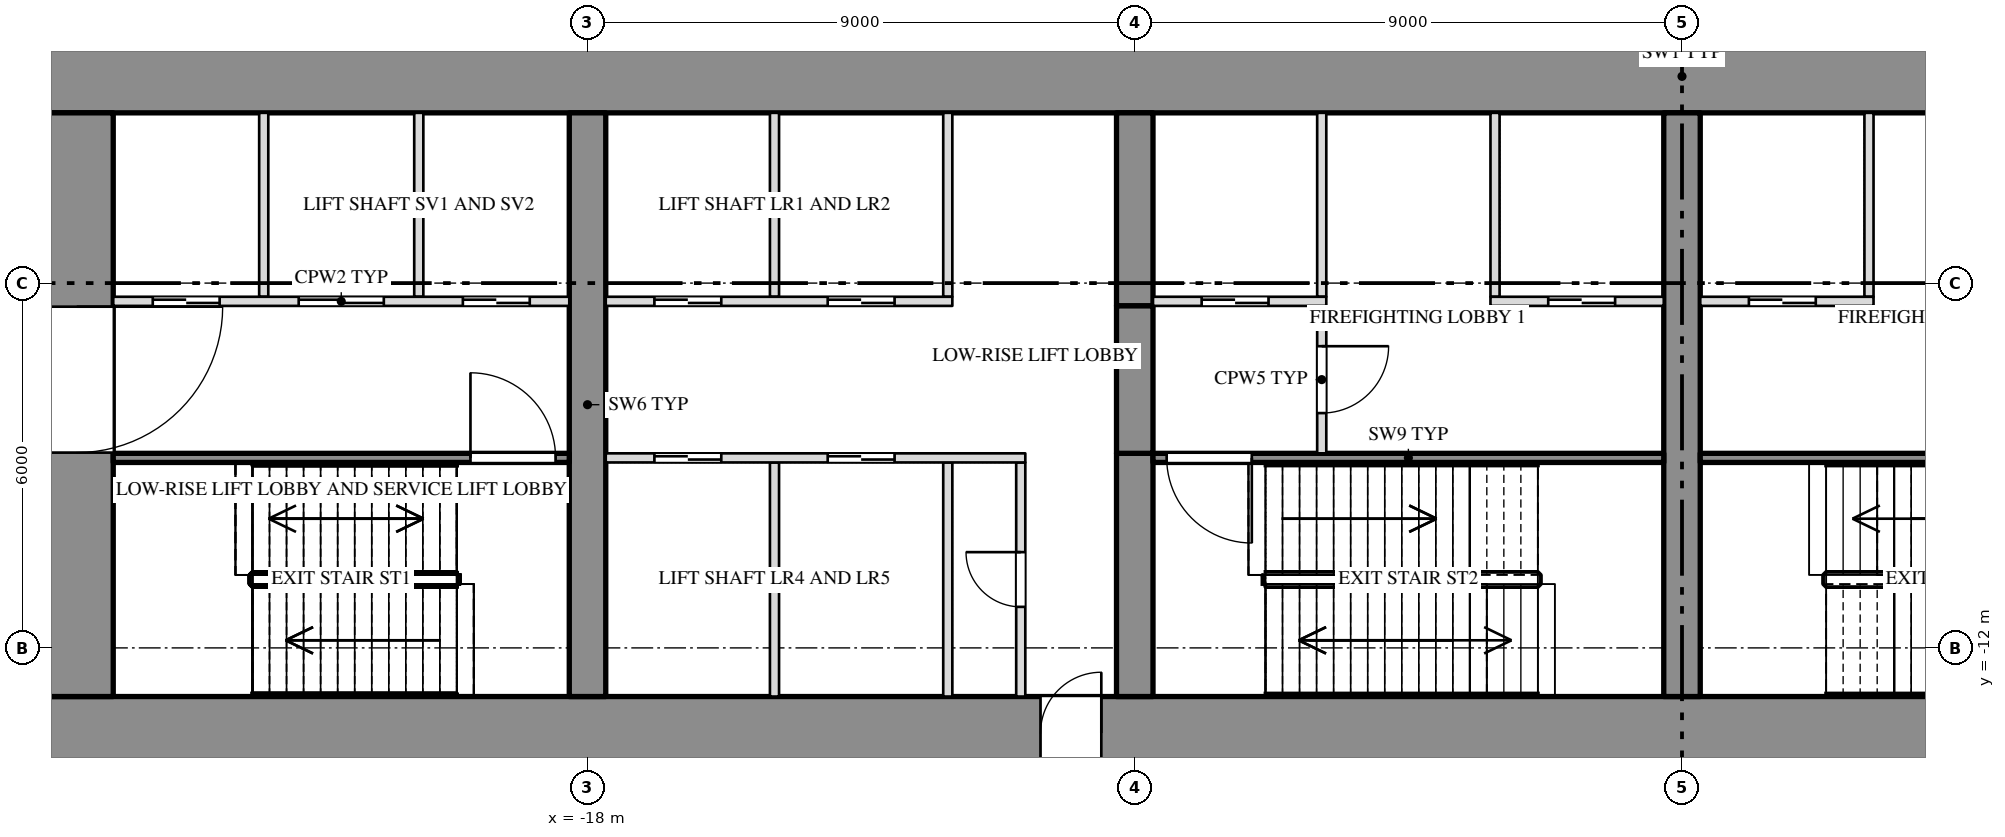
"""IFC4 building model, lengths in metres.
Left out: names, types, materials, properties, quantities, classifications, styles, units other than length and angle.
Written with IfcOpenShell. Run it as: python <this file> out.ifc"""

import sys

from ifc_helpers import new_model, si_unit, direction, frame, frame_2d, origin, place, context, subcontext, project, spatial, rectangle, extrude, element, fill, save


model = new_model("IFC4")
c1 = context("Model", 3, precision=1e-05, world=origin(), true_north=direction((0.0, 1.0)))
c2 = subcontext(c1, "Body", "Model", "MODEL_VIEW")
j1 = project(units=[si_unit("LENGTHUNIT", "METRE"), si_unit("PLANEANGLEUNIT", "RADIAN")], contexts=[c1])
p1 = place(None, origin())
s1 = spatial("IfcSite", under=j1, at=p1, CompositionType="ELEMENT")
p2 = place(p1, origin())
s2 = spatial("IfcBuilding", under=s1, at=p2, CompositionType="ELEMENT")
p3 = place(p2, frame((0.0, 0.0, 9.0)))
s3 = spatial("IfcBuildingStorey", under=s2, at=p3, CompositionType="ELEMENT", Elevation=9.0)
p4 = place(p3, frame((-27.0, -2.6, 0.0), z_axis=(0.0, 0.0, 1.0), x_axis=(1.0, 0.0, 0.0)))
e1 = element("IfcWall", 1, at=p4, inside=s3, PredefinedType="SHEAR", context=c2, shape_type="SweptSolid", body=[
    extrude(rectangle(XDim=54.0, YDim=1.2, at=frame_2d((27.0, 0.0))), origin(), (0.0, 0.0, 1.0), 5.7),
])
p5 = place(p3, frame((-27.0, -13.4, 0.0), z_axis=(0.0, 0.0, 1.0), x_axis=(1.0, 0.0, 0.0)))
e2 = element("IfcWall", 2, at=p5, inside=s3, PredefinedType="SHEAR", context=c2, shape_type="SweptSolid", body=[
    extrude(rectangle(XDim=54.0, YDim=1.2, at=frame_2d((27.0, 0.0))), origin(), (0.0, 0.0, 1.0), 5.7),
])
p6 = place(p5, frame((16.45, 0.0, 0.0)))
e3 = element("IfcOpeningElement", 3, at=p6, cuts=e2, PredefinedType="OPENING", context=c2, shape_type="SweptSolid", body=[
    extrude(rectangle(XDim=1.0, YDim=2.1, at=frame_2d((0.5, 1.05))), frame((0.0, 0.612, 0.0), z_axis=(0.0, -1.0, 0.0), x_axis=(1.0, 0.0, 0.0)), (0.0, 0.0, 1.0), 1.224),
])
p7 = place(p5, frame((36.55, 0.0, 0.0)))
e4 = element("IfcOpeningElement", 4, at=p7, cuts=e2, PredefinedType="OPENING", context=c2, shape_type="SweptSolid", body=[
    extrude(rectangle(XDim=1.0, YDim=2.1, at=frame_2d((0.5, 1.05))), frame((0.0, 0.612, 0.0), z_axis=(0.0, -1.0, 0.0), x_axis=(1.0, 0.0, 0.0)), (0.0, 0.0, 1.0), 1.224),
])
p8 = place(p3, frame((-26.4, -12.8, 0.0), z_axis=(0.0, 0.0, 1.0), x_axis=(0.0, 1.0, 0.0)))
e5 = element("IfcWall", 5, at=p8, inside=s3, PredefinedType="SHEAR", context=c2, shape_type="SweptSolid", body=[
    extrude(rectangle(XDim=9.6, YDim=1.2, at=frame_2d((4.8, 0.0))), origin(), (0.0, 0.0, 1.0), 5.7),
])
p9 = place(p8, frame((4.012, 0.0, 0.0)))
e6 = element("IfcOpeningElement", 6, at=p9, cuts=e5, PredefinedType="OPENING", context=c2, shape_type="SweptSolid", body=[
    extrude(rectangle(XDim=2.4, YDim=2.1, at=frame_2d((1.2, 1.05))), frame((0.0, 0.612, 0.0), z_axis=(0.0, -1.0, 0.0), x_axis=(1.0, 0.0, 0.0)), (0.0, 0.0, 1.0), 1.224),
])
p10 = place(p3, frame((-18.0, -12.8, 0.0), z_axis=(0.0, 0.0, 1.0), x_axis=(0.0, 1.0, 0.0)))
e7 = element("IfcWall", 7, at=p10, inside=s3, PredefinedType="SHEAR", context=c2, shape_type="SweptSolid", body=[
    extrude(rectangle(XDim=9.6, YDim=0.6, at=frame_2d((4.8, 0.0))), origin(), (0.0, 0.0, 1.0), 5.7),
])
p11 = place(p3, frame((-9.0, -12.8, 0.0), z_axis=(0.0, 0.0, 1.0), x_axis=(0.0, 1.0, 0.0)))
e8 = element("IfcWall", 8, at=p11, inside=s3, PredefinedType="SHEAR", context=c2, shape_type="SweptSolid", body=[
    extrude(rectangle(XDim=4.0, YDim=0.6, at=frame_2d((2.0, 0.0))), origin(), (0.0, 0.0, 1.0), 5.7),
])
p12 = place(p3, frame((-9.0, -6.375, 0.0), z_axis=(0.0, 0.0, 1.0), x_axis=(0.0, 1.0, 0.0)))
e9 = element("IfcWall", 9, at=p12, inside=s3, PredefinedType="SHEAR", context=c2, shape_type="SweptSolid", body=[
    extrude(rectangle(XDim=3.175, YDim=0.6, at=frame_2d((1.587, 0.0))), origin(), (0.0, 0.0, 1.0), 5.7),
])
p13 = place(p3, frame((-9.0, -8.8, 3.6), z_axis=(0.0, 0.0, 1.0), x_axis=(0.0, 1.0, 0.0)))
e10 = element("IfcWall", 10, at=p13, inside=s3, PredefinedType="SHEAR", context=c2, shape_type="SweptSolid", body=[
    extrude(rectangle(XDim=2.425, YDim=0.6, at=frame_2d((1.212, 0.0))), origin(), (0.0, 0.0, 1.0), 2.1),
])
p14 = place(p3, frame((0.0, -12.8, 0.0), z_axis=(0.0, 0.0, 1.0), x_axis=(0.0, 1.0, 0.0)))
e11 = element("IfcWall", 11, at=p14, inside=s3, PredefinedType="SHEAR", context=c2, shape_type="SweptSolid", body=[
    extrude(rectangle(XDim=9.6, YDim=0.6, at=frame_2d((4.8, 0.0))), origin(), (0.0, 0.0, 1.0), 5.7),
])
for number, where, z_axis, x_axis in (
    (12, (-20.775, -6.225, 0.0), (0.0, 0.0, 1.0), (0.0, 1.0, 0.0)),
    (13, (-23.325, -6.225, 0.0), (0.0, 0.0, 1.0), (0.0, 1.0, 0.0)),
    (14, (-12.075, -6.225, 0.0), (0.0, 0.0, 1.0), (0.0, 1.0, 0.0)),
    (15, (-14.925, -6.225, 0.0), (0.0, 0.0, 1.0), (0.0, 1.0, 0.0)),
    (16, (-3.075, -6.225, 0.0), (0.0, 0.0, 1.0), (0.0, 1.0, 0.0)),
    (17, (-5.925, -6.225, 0.0), (0.0, 0.0, 1.0), (0.0, 1.0, 0.0)),
    (18, (3.075, -6.225, 0.0), (0.0, 0.0, 1.0), (0.0, 1.0, 0.0)),
):
    element("IfcWall", number, at=place(p3, frame(where, z_axis=z_axis, x_axis=x_axis)), inside=s3, PredefinedType="PARTITIONING", context=c2, shape_type="SweptSolid", body=[
        extrude(rectangle(XDim=3.025, YDim=0.15, at=frame_2d((1.513, 0.0))), origin(), (0.0, 0.0, 1.0), 5.7),
    ])
p15 = place(p3, frame((-10.875, -12.8, 0.0), z_axis=(0.0, 0.0, 1.0), x_axis=(0.0, 1.0, 0.0)))
e19 = element("IfcWall", 19, at=p15, inside=s3, PredefinedType="PARTITIONING", context=c2, shape_type="SweptSolid", body=[
    extrude(rectangle(XDim=3.85, YDim=0.15, at=frame_2d((1.925, 0.0))), origin(), (0.0, 0.0, 1.0), 5.7),
])
p16 = place(p15, frame((1.475, 0.0, 0.0)))
e20 = element("IfcOpeningElement", 20, at=p16, cuts=e19, PredefinedType="OPENING", context=c2, shape_type="SweptSolid", body=[
    extrude(rectangle(XDim=0.9, YDim=2.1, at=frame_2d((0.45, 1.05))), frame((0.0, 0.087, 0.0), z_axis=(0.0, -1.0, 0.0), x_axis=(1.0, 0.0, 0.0)), (0.0, 0.0, 1.0), 0.174),
])
for number, where, z_axis, x_axis in (
    (21, (-12.075, -12.8, 0.0), (0.0, 0.0, 1.0), (0.0, 1.0, 0.0)),
    (22, (-14.925, -12.8, 0.0), (0.0, 0.0, 1.0), (0.0, 1.0, 0.0)),
):
    element("IfcWall", number, at=place(p3, frame(where, z_axis=z_axis, x_axis=x_axis)), inside=s3, PredefinedType="PARTITIONING", context=c2, shape_type="SweptSolid", body=[
        extrude(rectangle(XDim=3.85, YDim=0.15, at=frame_2d((1.925, 0.0))), origin(), (0.0, 0.0, 1.0), 5.7),
    ])
p17 = place(p3, frame((-5.925, -8.8, 0.0), z_axis=(0.0, 0.0, 1.0), x_axis=(0.0, 1.0, 0.0)))
e23 = element("IfcWall", 23, at=p17, inside=s3, PredefinedType="PARTITIONING", context=c2, shape_type="SweptSolid", body=[
    extrude(rectangle(XDim=2.425, YDim=0.15, at=frame_2d((1.212, 0.0))), origin(), (0.0, 0.0, 1.0), 5.7),
])
p18 = place(p17, frame((0.662, 0.0, 0.0)))
e24 = element("IfcOpeningElement", 24, at=p18, cuts=e23, PredefinedType="OPENING", context=c2, shape_type="SweptSolid", body=[
    extrude(rectangle(XDim=1.1, YDim=2.1, at=frame_2d((0.55, 1.05))), frame((0.0, 0.087, 0.0), z_axis=(0.0, -1.0, 0.0), x_axis=(1.0, 0.0, 0.0)), (0.0, 0.0, 1.0), 0.174),
])
p19 = place(p3, frame((-25.8, -6.3, 0.0), z_axis=(0.0, 0.0, 1.0), x_axis=(1.0, 0.0, 0.0)))
e25 = element("IfcWall", 25, at=p19, inside=s3, PredefinedType="PARTITIONING", context=c2, shape_type="SweptSolid", body=[
    extrude(rectangle(XDim=7.5, YDim=0.15, at=frame_2d((3.75, 0.0))), origin(), (0.0, 0.0, 1.0), 5.7),
])
p20 = place(p19, frame((0.65, 0.0, 0.0)))
e26 = element("IfcOpeningElement", 26, at=p20, cuts=e25, PredefinedType="OPENING", context=c2, shape_type="SweptSolid", body=[
    extrude(rectangle(XDim=1.1, YDim=2.1, at=frame_2d((0.55, 1.05))), frame((0.0, 0.087, 0.0), z_axis=(0.0, -1.0, 0.0), x_axis=(1.0, 0.0, 0.0)), (0.0, 0.0, 1.0), 0.174),
])
p21 = place(p19, frame((3.05, 0.0, 0.0)))
e27 = element("IfcOpeningElement", 27, at=p21, cuts=e25, PredefinedType="OPENING", context=c2, shape_type="SweptSolid", body=[
    extrude(rectangle(XDim=1.4, YDim=2.1, at=frame_2d((0.7, 1.05))), frame((0.0, 0.087, 0.0), z_axis=(0.0, -1.0, 0.0), x_axis=(1.0, 0.0, 0.0)), (0.0, 0.0, 1.0), 0.174),
])
p22 = place(p19, frame((5.75, 0.0, 0.0)))
e28 = element("IfcOpeningElement", 28, at=p22, cuts=e25, PredefinedType="OPENING", context=c2, shape_type="SweptSolid", body=[
    extrude(rectangle(XDim=1.1, YDim=2.1, at=frame_2d((0.55, 1.05))), frame((0.0, 0.087, 0.0), z_axis=(0.0, -1.0, 0.0), x_axis=(1.0, 0.0, 0.0)), (0.0, 0.0, 1.0), 0.174),
])
p23 = place(p3, frame((-17.7, -6.3, 0.0), z_axis=(0.0, 0.0, 1.0), x_axis=(1.0, 0.0, 0.0)))
e29 = element("IfcWall", 29, at=p23, inside=s3, PredefinedType="PARTITIONING", context=c2, shape_type="SweptSolid", body=[
    extrude(rectangle(XDim=5.7, YDim=0.15, at=frame_2d((2.85, 0.0))), origin(), (0.0, 0.0, 1.0), 5.7),
])
p24 = place(p23, frame((0.8, 0.0, 0.0)))
e30 = element("IfcOpeningElement", 30, at=p24, cuts=e29, PredefinedType="OPENING", context=c2, shape_type="SweptSolid", body=[
    extrude(rectangle(XDim=1.1, YDim=2.1, at=frame_2d((0.55, 1.05))), frame((0.0, 0.087, 0.0), z_axis=(0.0, -1.0, 0.0), x_axis=(1.0, 0.0, 0.0)), (0.0, 0.0, 1.0), 0.174),
])
p25 = place(p23, frame((3.65, 0.0, 0.0)))
e31 = element("IfcOpeningElement", 31, at=p25, cuts=e29, PredefinedType="OPENING", context=c2, shape_type="SweptSolid", body=[
    extrude(rectangle(XDim=1.1, YDim=2.1, at=frame_2d((0.55, 1.05))), frame((0.0, 0.087, 0.0), z_axis=(0.0, -1.0, 0.0), x_axis=(1.0, 0.0, 0.0)), (0.0, 0.0, 1.0), 0.174),
])
p26 = place(p3, frame((-8.7, -6.3, 0.0), z_axis=(0.0, 0.0, 1.0), x_axis=(1.0, 0.0, 0.0)))
e32 = element("IfcWall", 32, at=p26, inside=s3, PredefinedType="PARTITIONING", context=c2, shape_type="SweptSolid", body=[
    extrude(rectangle(XDim=2.85, YDim=0.15, at=frame_2d((1.425, 0.0))), origin(), (0.0, 0.0, 1.0), 5.7),
])
p27 = place(p26, frame((0.8, 0.0, 0.0)))
e33 = element("IfcOpeningElement", 33, at=p27, cuts=e32, PredefinedType="OPENING", context=c2, shape_type="SweptSolid", body=[
    extrude(rectangle(XDim=1.1, YDim=2.1, at=frame_2d((0.55, 1.05))), frame((0.0, 0.087, 0.0), z_axis=(0.0, -1.0, 0.0), x_axis=(1.0, 0.0, 0.0)), (0.0, 0.0, 1.0), 0.174),
])
p28 = place(p3, frame((-3.15, -6.3, 0.0), z_axis=(0.0, 0.0, 1.0), x_axis=(1.0, 0.0, 0.0)))
e34 = element("IfcWall", 34, at=p28, inside=s3, PredefinedType="PARTITIONING", context=c2, shape_type="SweptSolid", body=[
    extrude(rectangle(XDim=2.85, YDim=0.15, at=frame_2d((1.425, 0.0))), origin(), (0.0, 0.0, 1.0), 5.7),
])
p29 = place(p28, frame((0.95, 0.0, 0.0)))
e35 = element("IfcOpeningElement", 35, at=p29, cuts=e34, PredefinedType="OPENING", context=c2, shape_type="SweptSolid", body=[
    extrude(rectangle(XDim=1.1, YDim=2.1, at=frame_2d((0.55, 1.05))), frame((0.0, 0.087, 0.0), z_axis=(0.0, -1.0, 0.0), x_axis=(1.0, 0.0, 0.0)), (0.0, 0.0, 1.0), 0.174),
])
p30 = place(p3, frame((0.3, -6.3, 0.0), z_axis=(0.0, 0.0, 1.0), x_axis=(1.0, 0.0, 0.0)))
e36 = element("IfcWall", 36, at=p30, inside=s3, PredefinedType="PARTITIONING", context=c2, shape_type="SweptSolid", body=[
    extrude(rectangle(XDim=2.85, YDim=0.15, at=frame_2d((1.425, 0.0))), origin(), (0.0, 0.0, 1.0), 5.7),
])
p31 = place(p30, frame((0.8, 0.0, 0.0)))
e37 = element("IfcOpeningElement", 37, at=p31, cuts=e36, PredefinedType="OPENING", context=c2, shape_type="SweptSolid", body=[
    extrude(rectangle(XDim=1.1, YDim=2.1, at=frame_2d((0.55, 1.05))), frame((0.0, 0.087, 0.0), z_axis=(0.0, -1.0, 0.0), x_axis=(1.0, 0.0, 0.0)), (0.0, 0.0, 1.0), 0.174),
])
p32 = place(p3, frame((-25.8, -8.875, 0.0), z_axis=(0.0, 0.0, 1.0), x_axis=(1.0, 0.0, 0.0)))
e38 = element("IfcWall", 38, at=p32, inside=s3, PredefinedType="SHEAR", context=c2, shape_type="SweptSolid", body=[
    extrude(rectangle(XDim=7.5, YDim=0.15, at=frame_2d((3.75, 0.0))), origin(), (0.0, 0.0, 1.0), 5.7),
])
p33 = place(p32, frame((5.875, 0.0, 0.0)))
e39 = element("IfcOpeningElement", 39, at=p33, cuts=e38, PredefinedType="OPENING", context=c2, shape_type="SweptSolid", body=[
    extrude(rectangle(XDim=1.4, YDim=2.1, at=frame_2d((0.7, 1.05))), frame((0.0, 0.087, 0.0), z_axis=(0.0, -1.0, 0.0), x_axis=(1.0, 0.0, 0.0)), (0.0, 0.0, 1.0), 0.174),
])
p34 = place(p3, frame((-17.7, -8.875, 0.0), z_axis=(0.0, 0.0, 1.0), x_axis=(1.0, 0.0, 0.0)))
e40 = element("IfcWall", 40, at=p34, inside=s3, PredefinedType="PARTITIONING", context=c2, shape_type="SweptSolid", body=[
    extrude(rectangle(XDim=6.9, YDim=0.15, at=frame_2d((3.45, 0.0))), origin(), (0.0, 0.0, 1.0), 5.7),
])
p35 = place(p34, frame((0.8, 0.0, 0.0)))
e41 = element("IfcOpeningElement", 41, at=p35, cuts=e40, PredefinedType="OPENING", context=c2, shape_type="SweptSolid", body=[
    extrude(rectangle(XDim=1.1, YDim=2.1, at=frame_2d((0.55, 1.05))), frame((0.0, 0.087, 0.0), z_axis=(0.0, -1.0, 0.0), x_axis=(1.0, 0.0, 0.0)), (0.0, 0.0, 1.0), 0.174),
])
p36 = place(p34, frame((3.65, 0.0, 0.0)))
e42 = element("IfcOpeningElement", 42, at=p36, cuts=e40, PredefinedType="OPENING", context=c2, shape_type="SweptSolid", body=[
    extrude(rectangle(XDim=1.1, YDim=2.1, at=frame_2d((0.55, 1.05))), frame((0.0, 0.087, 0.0), z_axis=(0.0, -1.0, 0.0), x_axis=(1.0, 0.0, 0.0)), (0.0, 0.0, 1.0), 0.174),
])
p37 = place(p3, frame((-8.7, -8.875, 0.0), z_axis=(0.0, 0.0, 1.0), x_axis=(1.0, 0.0, 0.0)))
e43 = element("IfcWall", 43, at=p37, inside=s3, PredefinedType="SHEAR", context=c2, shape_type="SweptSolid", body=[
    extrude(rectangle(XDim=8.4, YDim=0.15, at=frame_2d((4.2, 0.0))), origin(), (0.0, 0.0, 1.0), 5.7),
])
p38 = place(p37, frame((0.225, 0.0, 0.0)))
e44 = element("IfcOpeningElement", 44, at=p38, cuts=e43, PredefinedType="OPENING", context=c2, shape_type="SweptSolid", body=[
    extrude(rectangle(XDim=1.4, YDim=2.1, at=frame_2d((0.7, 1.05))), frame((0.0, 0.087, 0.0), z_axis=(0.0, -1.0, 0.0), x_axis=(1.0, 0.0, 0.0)), (0.0, 0.0, 1.0), 0.174),
])
p39 = place(p3, frame((0.3, -8.875, 0.0), z_axis=(0.0, 0.0, 1.0), x_axis=(1.0, 0.0, 0.0)))
e45 = element("IfcWall", 45, at=p39, inside=s3, PredefinedType="SHEAR", context=c2, shape_type="SweptSolid", body=[
    extrude(rectangle(XDim=8.4, YDim=0.15, at=frame_2d((4.2, 0.0))), origin(), (0.0, 0.0, 1.0), 5.7),
])
p40 = place(p39, frame((6.775, 0.0, 0.0)))
e46 = element("IfcOpeningElement", 46, at=p40, cuts=e45, PredefinedType="OPENING", context=c2, shape_type="SweptSolid", body=[
    extrude(rectangle(XDim=1.4, YDim=2.1, at=frame_2d((0.7, 1.05))), frame((0.0, 0.087, 0.0), z_axis=(0.0, -1.0, 0.0), x_axis=(1.0, 0.0, 0.0)), (0.0, 0.0, 1.0), 0.174),
])
p41 = place(p9, origin())
e47 = element("IfcDoor", 47, at=p41, inside=s3, OperationType="DOUBLE_DOOR_SINGLE_SWING", PredefinedType="DOOR", context=c2, shape_type="SweptSolid", body=[
    extrude(rectangle(XDim=2.4, YDim=2.1, at=frame_2d((1.2, 1.05))), frame((0.0, 0.025, 0.0), z_axis=(0.0, -1.0, 0.0), x_axis=(1.0, 0.0, 0.0)), (0.0, 0.0, 1.0), 0.05),
])
fill(e6, e47)
p42 = place(p20, origin())
e48 = element("IfcDoor", 48, at=p42, inside=s3, OperationType="SLIDING_TO_RIGHT", PredefinedType="DOOR", context=c2, shape_type="SweptSolid", body=[
    extrude(rectangle(XDim=1.1, YDim=2.1, at=frame_2d((0.55, 1.05))), frame((0.0, 0.025, 0.0), z_axis=(0.0, -1.0, 0.0), x_axis=(1.0, 0.0, 0.0)), (0.0, 0.0, 1.0), 0.05),
])
fill(e26, e48)
p43 = place(p21, origin())
e49 = element("IfcDoor", 49, at=p43, inside=s3, OperationType="SLIDING_TO_LEFT", PredefinedType="DOOR", context=c2, shape_type="SweptSolid", body=[
    extrude(rectangle(XDim=1.4, YDim=2.1, at=frame_2d((0.7, 1.05))), frame((0.0, 0.025, 0.0), z_axis=(0.0, -1.0, 0.0), x_axis=(1.0, 0.0, 0.0)), (0.0, 0.0, 1.0), 0.05),
])
fill(e27, e49)
p44 = place(p22, origin())
e50 = element("IfcDoor", 50, at=p44, inside=s3, OperationType="SLIDING_TO_RIGHT", PredefinedType="DOOR", context=c2, shape_type="SweptSolid", body=[
    extrude(rectangle(XDim=1.1, YDim=2.1, at=frame_2d((0.55, 1.05))), frame((0.0, 0.025, 0.0), z_axis=(0.0, -1.0, 0.0), x_axis=(1.0, 0.0, 0.0)), (0.0, 0.0, 1.0), 0.05),
])
fill(e28, e50)
p45 = place(p33, origin())
e51 = element("IfcDoor", 51, at=p45, inside=s3, OperationType="DOUBLE_DOOR_SINGLE_SWING", PredefinedType="DOOR", context=c2, shape_type="SweptSolid", body=[
    extrude(rectangle(XDim=1.4, YDim=2.1, at=frame_2d((0.7, 1.05))), frame((0.0, 0.025, 0.0), z_axis=(0.0, -1.0, 0.0), x_axis=(1.0, 0.0, 0.0)), (0.0, 0.0, 1.0), 0.05),
])
fill(e39, e51)
p46 = place(p35, origin())
e52 = element("IfcDoor", 52, at=p46, inside=s3, OperationType="SLIDING_TO_RIGHT", PredefinedType="DOOR", context=c2, shape_type="SweptSolid", body=[
    extrude(rectangle(XDim=1.1, YDim=2.1, at=frame_2d((0.55, 1.05))), frame((0.0, 0.025, 0.0), z_axis=(0.0, -1.0, 0.0), x_axis=(1.0, 0.0, 0.0)), (0.0, 0.0, 1.0), 0.05),
])
fill(e41, e52)
p47 = place(p24, origin())
e53 = element("IfcDoor", 53, at=p47, inside=s3, OperationType="SLIDING_TO_LEFT", PredefinedType="DOOR", context=c2, shape_type="SweptSolid", body=[
    extrude(rectangle(XDim=1.1, YDim=2.1, at=frame_2d((0.55, 1.05))), frame((0.0, 0.025, 0.0), z_axis=(0.0, -1.0, 0.0), x_axis=(1.0, 0.0, 0.0)), (0.0, 0.0, 1.0), 0.05),
])
fill(e30, e53)
p48 = place(p36, origin())
e54 = element("IfcDoor", 54, at=p48, inside=s3, OperationType="SLIDING_TO_RIGHT", PredefinedType="DOOR", context=c2, shape_type="SweptSolid", body=[
    extrude(rectangle(XDim=1.1, YDim=2.1, at=frame_2d((0.55, 1.05))), frame((0.0, 0.025, 0.0), z_axis=(0.0, -1.0, 0.0), x_axis=(1.0, 0.0, 0.0)), (0.0, 0.0, 1.0), 0.05),
])
fill(e42, e54)
p49 = place(p25, origin())
e55 = element("IfcDoor", 55, at=p49, inside=s3, OperationType="SLIDING_TO_LEFT", PredefinedType="DOOR", context=c2, shape_type="SweptSolid", body=[
    extrude(rectangle(XDim=1.1, YDim=2.1, at=frame_2d((0.55, 1.05))), frame((0.0, 0.025, 0.0), z_axis=(0.0, -1.0, 0.0), x_axis=(1.0, 0.0, 0.0)), (0.0, 0.0, 1.0), 0.05),
])
fill(e31, e55)
p50 = place(p16, origin())
e56 = element("IfcDoor", 56, at=p50, inside=s3, OperationType="SINGLE_SWING_RIGHT", PredefinedType="DOOR", context=c2, shape_type="SweptSolid", body=[
    extrude(rectangle(XDim=0.9, YDim=2.1, at=frame_2d((0.45, 1.05))), frame((0.0, 0.025, 0.0), z_axis=(0.0, -1.0, 0.0), x_axis=(1.0, 0.0, 0.0)), (0.0, 0.0, 1.0), 0.05),
])
fill(e20, e56)
p51 = place(p6, origin())
e57 = element("IfcDoor", 57, at=p51, inside=s3, OperationType="SINGLE_SWING_RIGHT", PredefinedType="DOOR", context=c2, shape_type="SweptSolid", body=[
    extrude(rectangle(XDim=1.0, YDim=2.1, at=frame_2d((0.5, 1.05))), frame((0.0, 0.025, 0.0), z_axis=(0.0, -1.0, 0.0), x_axis=(1.0, 0.0, 0.0)), (0.0, 0.0, 1.0), 0.05),
])
fill(e3, e57)
p52 = place(p38, origin())
e58 = element("IfcDoor", 58, at=p52, inside=s3, OperationType="DOUBLE_DOOR_SINGLE_SWING", PredefinedType="DOOR", context=c2, shape_type="SweptSolid", body=[
    extrude(rectangle(XDim=1.4, YDim=2.1, at=frame_2d((0.7, 1.05))), frame((0.0, 0.025, 0.0), z_axis=(0.0, -1.0, 0.0), x_axis=(1.0, 0.0, 0.0)), (0.0, 0.0, 1.0), 0.05),
])
fill(e44, e58)
p53 = place(p27, origin())
e59 = element("IfcDoor", 59, at=p53, inside=s3, OperationType="SLIDING_TO_LEFT", PredefinedType="DOOR", context=c2, shape_type="SweptSolid", body=[
    extrude(rectangle(XDim=1.1, YDim=2.1, at=frame_2d((0.55, 1.05))), frame((0.0, 0.025, 0.0), z_axis=(0.0, -1.0, 0.0), x_axis=(1.0, 0.0, 0.0)), (0.0, 0.0, 1.0), 0.05),
])
fill(e33, e59)
p54 = place(p18, origin())
e60 = element("IfcDoor", 60, at=p54, inside=s3, OperationType="SINGLE_SWING_LEFT", PredefinedType="DOOR", context=c2, shape_type="SweptSolid", body=[
    extrude(rectangle(XDim=1.1, YDim=2.1, at=frame_2d((0.55, 1.05))), frame((0.0, 0.025, 0.0), z_axis=(0.0, -1.0, 0.0), x_axis=(1.0, 0.0, 0.0)), (0.0, 0.0, 1.0), 0.05),
])
fill(e24, e60)
p55 = place(p29, origin())
e61 = element("IfcDoor", 61, at=p55, inside=s3, OperationType="SLIDING_TO_LEFT", PredefinedType="DOOR", context=c2, shape_type="SweptSolid", body=[
    extrude(rectangle(XDim=1.1, YDim=2.1, at=frame_2d((0.55, 1.05))), frame((0.0, 0.025, 0.0), z_axis=(0.0, -1.0, 0.0), x_axis=(1.0, 0.0, 0.0)), (0.0, 0.0, 1.0), 0.05),
])
fill(e35, e61)
p56 = place(p31, origin())
e62 = element("IfcDoor", 62, at=p56, inside=s3, OperationType="SLIDING_TO_RIGHT", PredefinedType="DOOR", context=c2, shape_type="SweptSolid", body=[
    extrude(rectangle(XDim=1.1, YDim=2.1, at=frame_2d((0.55, 1.05))), frame((0.0, 0.025, 0.0), z_axis=(0.0, -1.0, 0.0), x_axis=(1.0, 0.0, 0.0)), (0.0, 0.0, 1.0), 0.05),
])
fill(e37, e62)
save(model, sys.argv[1])
